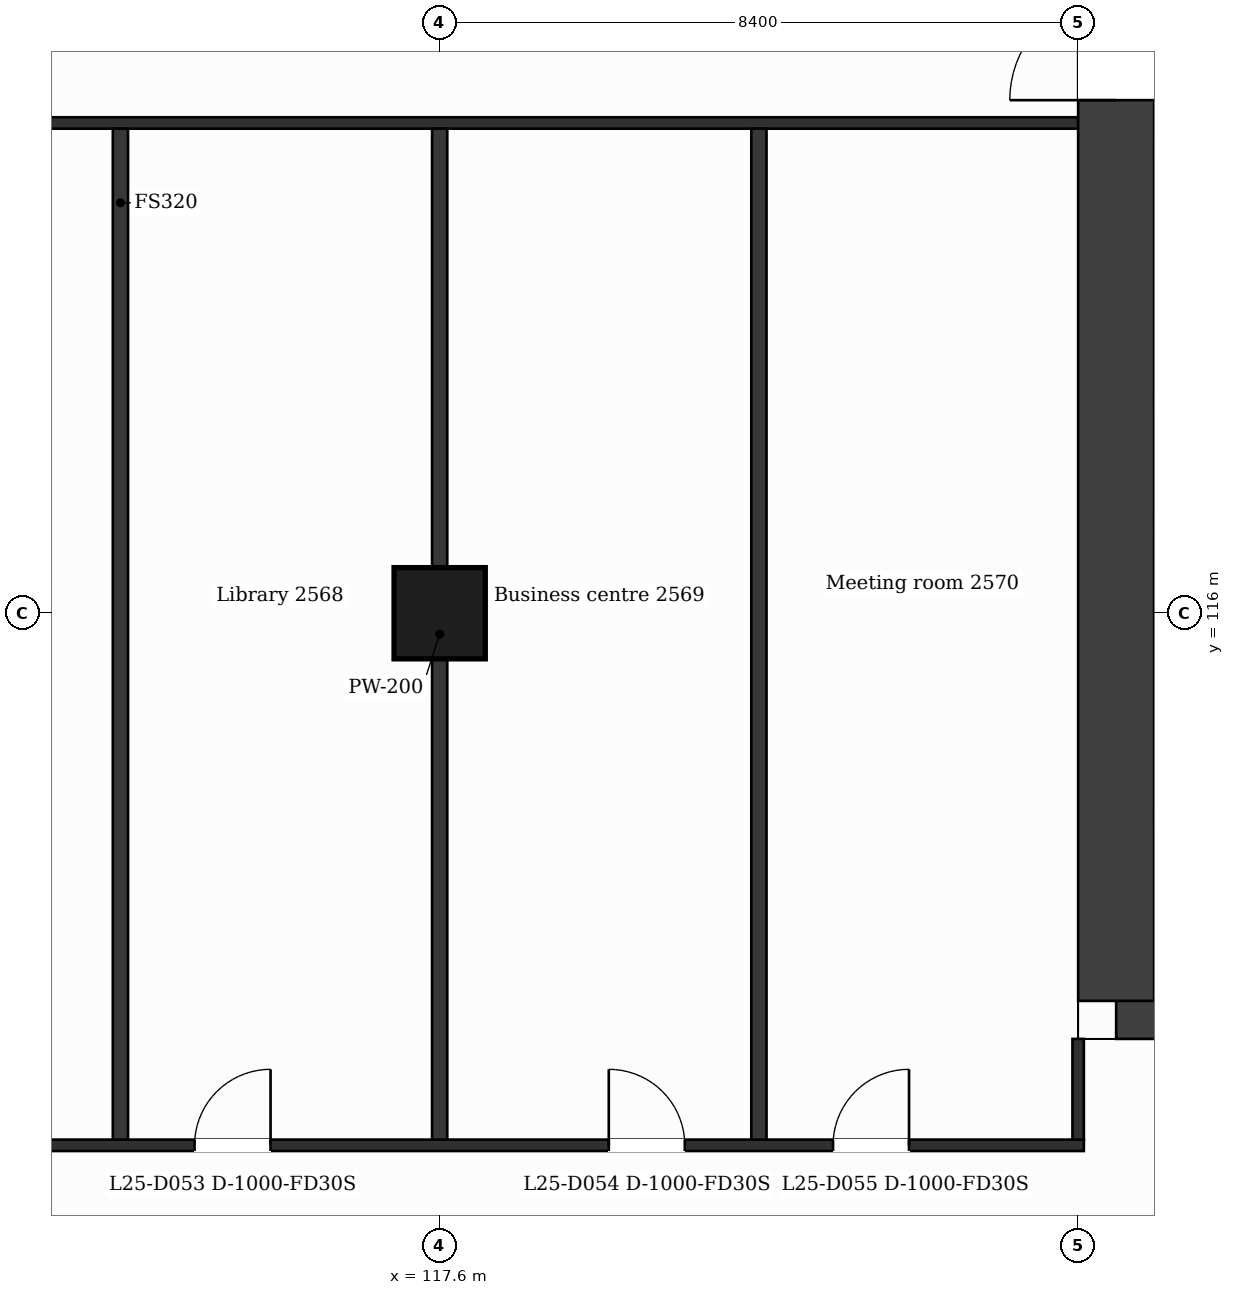
"""IFC4 building model, lengths in metres.
Left out: names, types, materials, properties, quantities, classifications, styles, units other than length and angle.
Written with IfcOpenShell. Run it as: python <this file> out.ifc"""

import sys

from ifc_helpers import new_model, si_unit, direction, frame, frame_2d, origin, origin_2d, place, context, subcontext, project, spatial, rectangle, extrude, element, fill, save


model = new_model("IFC4")
c1 = context("Model", 3, precision=1e-05, world=origin(), true_north=direction((0.0, 1.0)))
c2 = subcontext(c1, "Body", "Model", "MODEL_VIEW")
j1 = project(units=[si_unit("LENGTHUNIT", "METRE"), si_unit("PLANEANGLEUNIT", "RADIAN")], contexts=[c1])
p1 = place(None, origin())
s1 = spatial("IfcSite", under=j1, at=p1, CompositionType="ELEMENT")
p2 = place(p1, origin())
s2 = spatial("IfcBuilding", under=s1, at=p2, CompositionType="ELEMENT")
p3 = place(p2, frame((0.0, 0.0, 109.5)))
s3 = spatial("IfcBuildingStorey", under=s2, at=p3, CompositionType="ELEMENT", Elevation=109.5)
p4 = place(p3, frame((140.559, 110.9, 0.0), z_axis=(0.0, 0.0, 1.0), x_axis=(-1.0, 0.0, 0.0)))
e1 = element("IfcWall", 1, at=p4, inside=s3, PredefinedType="SHEAR", context=c2, shape_type="SweptSolid", body=[
    extrude(rectangle(XDim=14.059, YDim=1.0, at=frame_2d((7.029, 0.0))), origin(), (0.0, 0.0, 1.0), 3.7),
])
p5 = place(p4, frame((6.858, 0.0, 0.0)))
e2 = element("IfcOpeningElement", 2, at=p5, cuts=e1, PredefinedType="OPENING", context=c2, shape_type="SweptSolid", body=[
    extrude(rectangle(XDim=1.4, YDim=2.1, at=frame_2d((0.7, 1.05))), frame((0.0, 0.51, 0.0), z_axis=(0.0, -1.0, 0.0), x_axis=(1.0, 0.0, 0.0)), (0.0, 0.0, 1.0), 1.02),
])
p6 = place(p3, frame((126.5, 110.9, 0.0), z_axis=(0.0, 0.0, 1.0), x_axis=(0.0, 1.0, 0.0)))
e3 = element("IfcWall", 3, at=p6, inside=s3, PredefinedType="SHEAR", context=c2, shape_type="SweptSolid", body=[
    extrude(rectangle(XDim=21.0, YDim=1.0, at=frame_2d((10.5, 0.0))), origin(), (0.0, 0.0, 1.0), 3.7),
])
p7 = place(p6, frame((11.85, 0.0, 0.0)))
e4 = element("IfcOpeningElement", 4, at=p7, cuts=e3, PredefinedType="OPENING", context=c2, shape_type="SweptSolid", body=[
    extrude(rectangle(XDim=1.4, YDim=2.1, at=frame_2d((0.7, 1.05))), frame((0.0, 0.51, 0.0), z_axis=(0.0, -1.0, 0.0), x_axis=(1.0, 0.0, 0.0)), (0.0, 0.0, 1.0), 1.02),
])
p8 = place(p3, frame((117.6, 116.0, 0.0), z_axis=(0.0, 0.0, 1.0), x_axis=(1.0, 0.0, 0.0)))
e5 = element("IfcColumn", 5, at=p8, inside=s3, PredefinedType="COLUMN", context=c2, shape_type="SweptSolid", body=[
    extrude(rectangle(XDim=1.2, YDim=1.2, at=origin_2d()), origin(), (0.0, 0.0, 1.0), 3.7),
])
p9 = place(p3, frame((100.725, 109.0, 0.0), z_axis=(0.0, 0.0, 1.0), x_axis=(1.0, 0.0, 0.0)))
e6 = element("IfcWall", 6, at=p9, inside=s3, PredefinedType="PARTITIONING", context=c2, shape_type="SweptSolid", body=[
    extrude(rectangle(XDim=25.35, YDim=0.15, at=frame_2d((12.675, 0.0))), origin(), (0.0, 0.0, 1.0), 3.38),
])
p10 = place(p9, frame((4.445, 0.0, 0.0)))
e7 = element("IfcOpeningElement", 7, at=p10, cuts=e6, PredefinedType="OPENING", context=c2, shape_type="SweptSolid", body=[
    extrude(rectangle(XDim=1.0, YDim=2.1, at=frame_2d((0.5, 1.05))), frame((0.0, 0.085, 0.0), z_axis=(0.0, -1.0, 0.0), x_axis=(1.0, 0.0, 0.0)), (0.0, 0.0, 1.0), 0.17),
])
p11 = place(p9, frame((9.45, 0.0, 0.0)))
e8 = element("IfcOpeningElement", 8, at=p11, cuts=e6, PredefinedType="OPENING", context=c2, shape_type="SweptSolid", body=[
    extrude(rectangle(XDim=1.0, YDim=2.1, at=frame_2d((0.5, 1.05))), frame((0.0, 0.085, 0.0), z_axis=(0.0, -1.0, 0.0), x_axis=(1.0, 0.0, 0.0)), (0.0, 0.0, 1.0), 0.17),
])
p12 = place(p9, frame((13.65, 0.0, 0.0)))
e9 = element("IfcOpeningElement", 9, at=p12, cuts=e6, PredefinedType="OPENING", context=c2, shape_type="SweptSolid", body=[
    extrude(rectangle(XDim=1.0, YDim=2.1, at=frame_2d((0.5, 1.05))), frame((0.0, 0.085, 0.0), z_axis=(0.0, -1.0, 0.0), x_axis=(1.0, 0.0, 0.0)), (0.0, 0.0, 1.0), 0.17),
])
p13 = place(p9, frame((19.1, 0.0, 0.0)))
e10 = element("IfcOpeningElement", 10, at=p13, cuts=e6, PredefinedType="OPENING", context=c2, shape_type="SweptSolid", body=[
    extrude(rectangle(XDim=1.0, YDim=2.1, at=frame_2d((0.5, 1.05))), frame((0.0, 0.085, 0.0), z_axis=(0.0, -1.0, 0.0), x_axis=(1.0, 0.0, 0.0)), (0.0, 0.0, 1.0), 0.17),
])
p14 = place(p9, frame((22.05, 0.0, 0.0)))
e11 = element("IfcOpeningElement", 11, at=p14, cuts=e6, PredefinedType="OPENING", context=c2, shape_type="SweptSolid", body=[
    extrude(rectangle(XDim=1.0, YDim=2.1, at=frame_2d((0.5, 1.05))), frame((0.0, 0.085, 0.0), z_axis=(0.0, -1.0, 0.0), x_axis=(1.0, 0.0, 0.0)), (0.0, 0.0, 1.0), 0.17),
])
p15 = place(p3, frame((127.0, 113.3, 0.0), z_axis=(0.0, 0.0, 1.0), x_axis=(1.0, 0.0, 0.0)))
e12 = element("IfcWall", 12, at=p15, inside=s3, PredefinedType="PARTITIONING", context=c2, shape_type="SweptSolid", body=[
    extrude(rectangle(XDim=4.673, YDim=0.2, at=frame_2d((2.336, 0.0))), origin(), (0.0, 0.0, 1.0), 3.38),
])
p16 = place(p15, frame((0.642, 0.0, 0.0)))
e13 = element("IfcOpeningElement", 13, at=p16, cuts=e12, PredefinedType="OPENING", context=c2, shape_type="SweptSolid", body=[
    extrude(rectangle(XDim=1.1, YDim=2.1, at=frame_2d((0.55, 1.05))), frame((0.0, 0.11, 0.0), z_axis=(0.0, -1.0, 0.0), x_axis=(1.0, 0.0, 0.0)), (0.0, 0.0, 1.0), 0.22),
])
p17 = place(p3, frame((100.8, 122.45, 0.0), z_axis=(0.0, 0.0, 1.0), x_axis=(1.0, 0.0, 0.0)))
e14 = element("IfcWall", 14, at=p17, inside=s3, PredefinedType="PARTITIONING", context=c2, shape_type="SweptSolid", body=[
    extrude(rectangle(XDim=25.2, YDim=0.15, at=frame_2d((12.6, 0.0))), origin(), (0.0, 0.0, 1.0), 3.38),
])
for number, where, z_axis, x_axis in (
    (15, (113.4, 109.075, 0.0), (0.0, 0.0, 1.0), (0.0, 1.0, 0.0)),
    (16, (117.6, 109.075, 0.0), (0.0, 0.0, 1.0), (0.0, 1.0, 0.0)),
    (17, (121.8, 109.075, 0.0), (0.0, 0.0, 1.0), (0.0, 1.0, 0.0)),
):
    element("IfcWall", number, at=place(p3, frame(where, z_axis=z_axis, x_axis=x_axis)), inside=s3, PredefinedType="PARTITIONING", context=c2, shape_type="SweptSolid", body=[
        extrude(rectangle(XDim=13.3, YDim=0.2, at=frame_2d((6.65, 0.0))), origin(), (0.0, 0.0, 1.0), 3.38),
    ])
p18 = place(p3, frame((126.0, 109.075, 0.0), z_axis=(0.0, 0.0, 1.0), x_axis=(0.0, 1.0, 0.0)))
e18 = element("IfcWall", 18, at=p18, inside=s3, PredefinedType="PARTITIONING", context=c2, shape_type="SweptSolid", body=[
    extrude(rectangle(XDim=1.325, YDim=0.15, at=frame_2d((0.663, 0.0))), origin(), (0.0, 0.0, 1.0), 3.38),
])
p19 = place(p12, origin())
e19 = element("IfcDoor", 19, at=p19, inside=s3, OperationType="SINGLE_SWING_RIGHT", PredefinedType="DOOR", context=c2, shape_type="SweptSolid", body=[
    extrude(rectangle(XDim=1.0, YDim=2.1, at=frame_2d((0.5, 1.05))), frame((0.0, 0.025, 0.0), z_axis=(0.0, -1.0, 0.0), x_axis=(1.0, 0.0, 0.0)), (0.0, 0.0, 1.0), 0.05),
])
fill(e9, e19)
p20 = place(p13, origin())
e20 = element("IfcDoor", 20, at=p20, inside=s3, OperationType="SINGLE_SWING_LEFT", PredefinedType="DOOR", context=c2, shape_type="SweptSolid", body=[
    extrude(rectangle(XDim=1.0, YDim=2.1, at=frame_2d((0.5, 1.05))), frame((0.0, 0.025, 0.0), z_axis=(0.0, -1.0, 0.0), x_axis=(1.0, 0.0, 0.0)), (0.0, 0.0, 1.0), 0.05),
])
fill(e10, e20)
p21 = place(p14, origin())
e21 = element("IfcDoor", 21, at=p21, inside=s3, OperationType="SINGLE_SWING_RIGHT", PredefinedType="DOOR", context=c2, shape_type="SweptSolid", body=[
    extrude(rectangle(XDim=1.0, YDim=2.1, at=frame_2d((0.5, 1.05))), frame((0.0, 0.025, 0.0), z_axis=(0.0, -1.0, 0.0), x_axis=(1.0, 0.0, 0.0)), (0.0, 0.0, 1.0), 0.05),
])
fill(e11, e21)
p22 = place(p7, origin())
e22 = element("IfcDoor", 22, at=p22, inside=s3, OperationType="SINGLE_SWING_LEFT", PredefinedType="DOOR", context=c2, shape_type="SweptSolid", body=[
    extrude(rectangle(XDim=1.4, YDim=2.1, at=frame_2d((0.7, 1.05))), frame((0.0, 0.025, 0.0), z_axis=(0.0, -1.0, 0.0), x_axis=(1.0, 0.0, 0.0)), (0.0, 0.0, 1.0), 0.05),
])
fill(e4, e22)
save(model, sys.argv[1])
